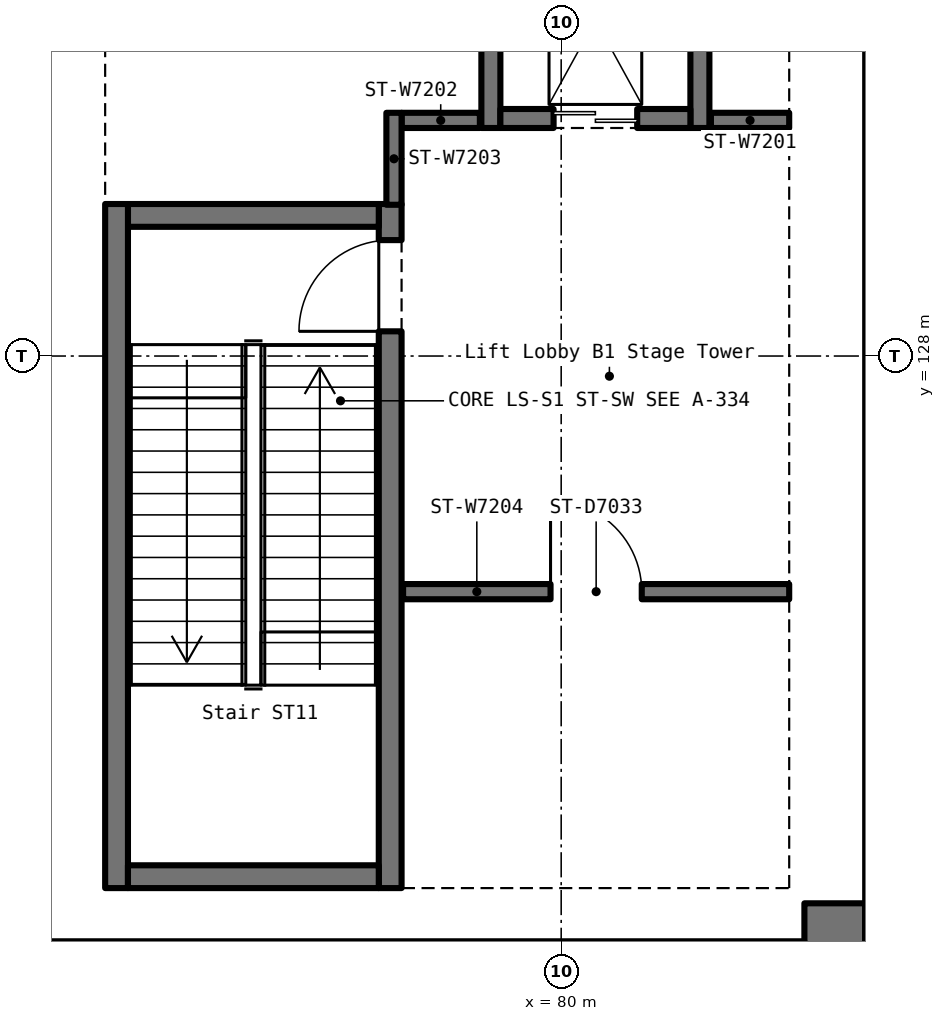
"""IFC4 building model, lengths in metres.
Left out: names, types, materials, properties, quantities, classifications, styles, units other than length and angle.
Written with IfcOpenShell. Run it as: python <this file> out.ifc"""

import sys

from ifc_helpers import new_model, si_unit, direction, frame, frame_2d, origin, place, context, subcontext, project, spatial, rectangle, extrude, element, fill, save


model = new_model("IFC4")
c1 = context("Model", 3, precision=1e-05, world=origin(), true_north=direction((0.0, 1.0)))
c2 = subcontext(c1, "Body", "Model", "MODEL_VIEW")
j1 = project(units=[si_unit("LENGTHUNIT", "METRE"), si_unit("PLANEANGLEUNIT", "RADIAN")], contexts=[c1])
p1 = place(None, origin())
s1 = spatial("IfcSite", under=j1, at=p1, CompositionType="ELEMENT")
p2 = place(p1, origin())
s2 = spatial("IfcBuilding", under=s1, at=p2, CompositionType="ELEMENT")
p3 = place(p2, frame((0.0, 0.0, -6.0)))
s3 = spatial("IfcBuildingStorey", under=s2, at=p3, CompositionType="ELEMENT", Elevation=-6.0)
p4 = place(p3, frame((83.6, 95.2, 0.0), z_axis=(0.0, 0.0, 1.0), x_axis=(0.0, 1.0, 0.0)))
e1 = element("IfcWall", 1, at=p4, inside=s3, PredefinedType="SHEAR", context=c2, shape_type="SweptSolid", body=[
    extrude(rectangle(XDim=25.6, YDim=0.8, at=frame_2d((12.8, 0.0))), origin(), (0.0, 0.0, 1.0), 6.0),
])
p5 = place(p4, frame((11.9, 0.0, 0.0)))
e2 = element("IfcOpeningElement", 2, at=p5, cuts=e1, PredefinedType="OPENING", context=c2, shape_type="SweptSolid", body=[
    extrude(rectangle(XDim=1.8, YDim=2.1, at=frame_2d((0.9, 1.05))), frame((0.0, 0.412, 0.0), z_axis=(0.0, -1.0, 0.0), x_axis=(1.0, 0.0, 0.0)), (0.0, 0.0, 1.0), 0.824),
])
p6 = place(p3, frame((77.75, 121.0, 0.0), z_axis=(0.0, 0.0, 1.0), x_axis=(0.0, 1.0, 0.0)))
e3 = element("IfcWall", 3, at=p6, inside=s3, PredefinedType="SOLIDWALL", context=c2, shape_type="SweptSolid", body=[
    extrude(rectangle(XDim=9.0, YDim=0.3, at=frame_2d((4.5, 0.0))), origin(), (0.0, 0.0, 1.0), 6.0),
])
p7 = place(p6, frame((7.325, 0.0, 0.0)))
e4 = element("IfcOpeningElement", 4, at=p7, cuts=e3, PredefinedType="OPENING", context=c2, shape_type="SweptSolid", body=[
    extrude(rectangle(XDim=1.2, YDim=2.1, at=frame_2d((0.6, 1.05))), frame((0.0, 0.162, 0.0), z_axis=(0.0, -1.0, 0.0), x_axis=(1.0, 0.0, 0.0)), (0.0, 0.0, 1.0), 0.324),
])
p8 = place(p3, frame((77.6, 129.85, 0.0), z_axis=(0.0, 0.0, 1.0), x_axis=(-1.0, 0.0, 0.0)))
e5 = element("IfcWall", 5, at=p8, inside=s3, PredefinedType="SOLIDWALL", context=c2, shape_type="SweptSolid", body=[
    extrude(rectangle(XDim=3.3, YDim=0.3, at=frame_2d((1.65, 0.0))), origin(), (0.0, 0.0, 1.0), 6.0),
])
p9 = place(p3, frame((74.15, 130.0, 0.0), z_axis=(0.0, 0.0, 1.0), x_axis=(0.0, -1.0, 0.0)))
e6 = element("IfcWall", 6, at=p9, inside=s3, PredefinedType="SOLIDWALL", context=c2, shape_type="SweptSolid", body=[
    extrude(rectangle(XDim=9.0, YDim=0.3, at=frame_2d((4.5, 0.0))), origin(), (0.0, 0.0, 1.0), 6.0),
])
p10 = place(p3, frame((74.3, 121.15, 0.0), z_axis=(0.0, 0.0, 1.0), x_axis=(1.0, 0.0, 0.0)))
e7 = element("IfcWall", 7, at=p10, inside=s3, PredefinedType="SOLIDWALL", context=c2, shape_type="SweptSolid", body=[
    extrude(rectangle(XDim=3.3, YDim=0.3, at=frame_2d((1.65, 0.0))), origin(), (0.0, 0.0, 1.0), 6.0),
])
for number, where, z_axis, x_axis in (
    (8, (81.825, 131.0, 0.0), (0.0, 0.0, 1.0), (0.0, 1.0, 0.0)),
    (9, (79.075, 135.0, 0.0), (0.0, 0.0, 1.0), (0.0, -1.0, 0.0)),
):
    element("IfcWall", number, at=place(p3, frame(where, z_axis=z_axis, x_axis=x_axis)), inside=s3, PredefinedType="SOLIDWALL", context=c2, shape_type="SweptSolid", body=[
        extrude(rectangle(XDim=4.0, YDim=0.25, at=frame_2d((2.0, 0.0))), origin(), (0.0, 0.0, 1.0), 6.0),
    ])
p11 = place(p3, frame((79.2, 131.125, 0.0), z_axis=(0.0, 0.0, 1.0), x_axis=(1.0, 0.0, 0.0)))
e10 = element("IfcWall", 10, at=p11, inside=s3, PredefinedType="SOLIDWALL", context=c2, shape_type="SweptSolid", body=[
    extrude(rectangle(XDim=2.5, YDim=0.25, at=frame_2d((1.25, 0.0))), origin(), (0.0, 0.0, 1.0), 6.0),
])
p12 = place(p11, frame((0.7, 0.0, 0.0)))
e11 = element("IfcOpeningElement", 11, at=p12, cuts=e10, PredefinedType="OPENING", context=c2, shape_type="SweptSolid", body=[
    extrude(rectangle(XDim=1.1, YDim=2.1, at=frame_2d((0.55, 1.05))), frame((0.0, 0.137, 0.0), z_axis=(0.0, -1.0, 0.0), x_axis=(1.0, 0.0, 0.0)), (0.0, 0.0, 1.0), 0.274),
])
for number, where, z_axis, x_axis in (
    (12, (83.0, 131.1, 0.0), (0.0, 0.0, 1.0), (-1.0, 0.0, 0.0)),
    (13, (78.93, 131.1, 0.0), (0.0, 0.0, 1.0), (-1.0, 0.0, 0.0)),
):
    element("IfcWall", number, at=place(p3, frame(where, z_axis=z_axis, x_axis=x_axis)), inside=s3, PredefinedType="PARTITIONING", context=c2, shape_type="SweptSolid", body=[
        extrude(rectangle(XDim=1.03, YDim=0.2, at=frame_2d((0.515, 0.0))), origin(), (0.0, 0.0, 1.0), 5.7),
    ])
p13 = place(p3, frame((77.8, 131.2, 0.0), z_axis=(0.0, 0.0, 1.0), x_axis=(0.0, -1.0, 0.0)))
e14 = element("IfcWall", 14, at=p13, inside=s3, PredefinedType="PARTITIONING", context=c2, shape_type="SweptSolid", body=[
    extrude(rectangle(XDim=1.21, YDim=0.2, at=frame_2d((0.605, 0.0))), origin(), (0.0, 0.0, 1.0), 5.7),
])
p14 = place(p3, frame((77.92, 124.9, 0.0), z_axis=(0.0, 0.0, 1.0), x_axis=(1.0, 0.0, 0.0)))
e15 = element("IfcWall", 15, at=p14, inside=s3, PredefinedType="PARTITIONING", context=c2, shape_type="SweptSolid", body=[
    extrude(rectangle(XDim=5.08, YDim=0.2, at=frame_2d((2.54, 0.0))), origin(), (0.0, 0.0, 1.0), 5.7),
])
p15 = place(p14, frame((1.94, 0.0, 0.0)))
e16 = element("IfcOpeningElement", 16, at=p15, cuts=e15, PredefinedType="OPENING", context=c2, shape_type="SweptSolid", body=[
    extrude(rectangle(XDim=1.2, YDim=2.1, at=frame_2d((0.6, 1.05))), frame((0.0, 0.112, 0.0), z_axis=(0.0, -1.0, 0.0), x_axis=(1.0, 0.0, 0.0)), (0.0, 0.0, 1.0), 0.224),
])
p16 = place(p7, origin())
e17 = element("IfcDoor", 17, at=p16, inside=s3, OperationType="SINGLE_SWING_LEFT", PredefinedType="DOOR", context=c2, shape_type="SweptSolid", body=[
    extrude(rectangle(XDim=1.2, YDim=2.1, at=frame_2d((0.6, 1.05))), frame((0.0, 0.025, 0.0), z_axis=(0.0, -1.0, 0.0), x_axis=(1.0, 0.0, 0.0)), (0.0, 0.0, 1.0), 0.05),
])
fill(e4, e17)
p17 = place(p12, origin())
e18 = element("IfcDoor", 18, at=p17, inside=s3, OperationType="DOUBLE_DOOR_SLIDING", PredefinedType="DOOR", context=c2, shape_type="SweptSolid", body=[
    extrude(rectangle(XDim=1.1, YDim=2.1, at=frame_2d((0.55, 1.05))), frame((0.0, 0.025, 0.0), z_axis=(0.0, -1.0, 0.0), x_axis=(1.0, 0.0, 0.0)), (0.0, 0.0, 1.0), 0.05),
])
fill(e11, e18)
p18 = place(p15, origin())
e19 = element("IfcDoor", 19, at=p18, inside=s3, OperationType="SINGLE_SWING_LEFT", PredefinedType="DOOR", context=c2, shape_type="SweptSolid", body=[
    extrude(rectangle(XDim=1.2, YDim=2.1, at=frame_2d((0.6, 1.05))), frame((0.0, 0.025, 0.0), z_axis=(0.0, -1.0, 0.0), x_axis=(1.0, 0.0, 0.0)), (0.0, 0.0, 1.0), 0.05),
])
fill(e16, e19)
save(model, sys.argv[1])
